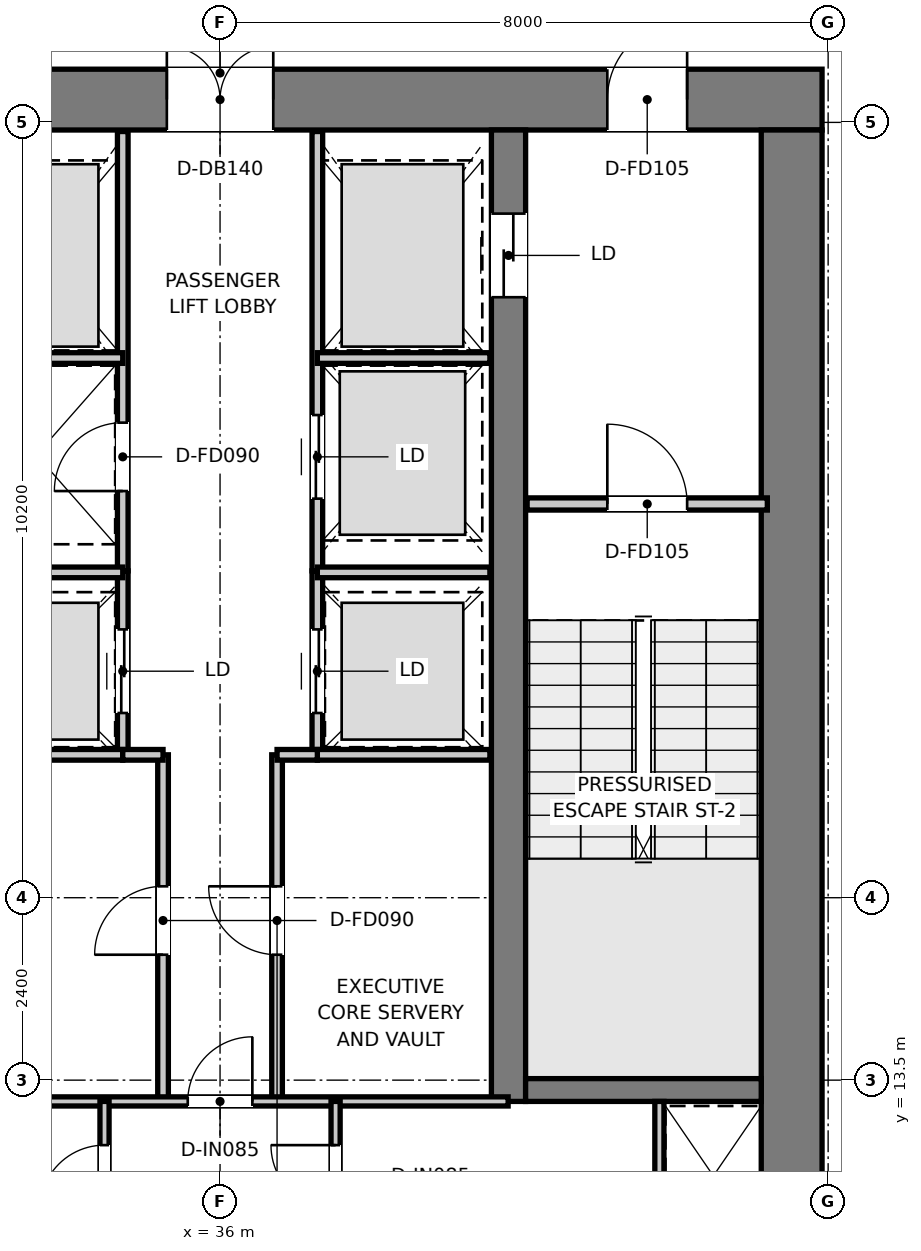
"""IFC4 building model, lengths in metres.
Left out: names, types, materials, properties, quantities, classifications, styles, units other than length and angle.
Written with IfcOpenShell. Run it as: python <this file> out.ifc"""

import sys

from ifc_helpers import new_model, si_unit, direction, frame, frame_2d, origin, place, context, subcontext, project, spatial, rectangle, extrude, element, fill, save


model = new_model("IFC4")
c1 = context("Model", 3, precision=1e-05, world=origin(), true_north=direction((0.0, 1.0)))
c2 = subcontext(c1, "Body", "Model", "MODEL_VIEW")
j1 = project(units=[si_unit("LENGTHUNIT", "METRE"), si_unit("PLANEANGLEUNIT", "RADIAN")], contexts=[c1])
p1 = place(None, origin())
s1 = spatial("IfcSite", under=j1, at=p1, CompositionType="ELEMENT")
p2 = place(p1, origin())
s2 = spatial("IfcBuilding", under=s1, at=p2, CompositionType="ELEMENT")
p3 = place(p2, frame((0.0, 0.0, 271.35)))
s3 = spatial("IfcBuildingStorey", under=s2, at=p3, CompositionType="ELEMENT", Elevation=271.35)
p4 = place(p3, frame((28.08, 26.4, 0.0), z_axis=(0.0, 0.0, 1.0), x_axis=(1.0, 0.0, 0.0)))
e1 = element("IfcWall", 1, at=p4, inside=s3, PredefinedType="SHEAR", context=c2, shape_type="SweptSolid", body=[
    extrude(rectangle(XDim=15.84, YDim=0.8, at=frame_2d((7.92, 0.0))), origin(), (0.0, 0.0, 1.0), 3.95),
])
p5 = place(p4, frame((7.22, 0.0, 0.0)))
e2 = element("IfcOpeningElement", 2, at=p5, cuts=e1, PredefinedType="OPENING", context=c2, shape_type="SweptSolid", body=[
    extrude(rectangle(XDim=1.4, YDim=2.2, at=frame_2d((0.7, 1.1))), frame((0.0, 0.41, 0.0), z_axis=(0.0, -1.0, 0.0), x_axis=(1.0, 0.0, 0.0)), (0.0, 0.0, 1.0), 0.82),
])
p6 = place(p4, frame((1.775, 0.0, 0.0)))
e3 = element("IfcOpeningElement", 3, at=p6, cuts=e1, PredefinedType="OPENING", context=c2, shape_type="SweptSolid", body=[
    extrude(rectangle(XDim=1.05, YDim=2.1, at=frame_2d((0.525, 1.05))), frame((0.0, 0.41, 0.0), z_axis=(0.0, -1.0, 0.0), x_axis=(1.0, 0.0, 0.0)), (0.0, 0.0, 1.0), 0.82),
])
p7 = place(p4, frame((13.015, 0.0, 0.0)))
e4 = element("IfcOpeningElement", 4, at=p7, cuts=e1, PredefinedType="OPENING", context=c2, shape_type="SweptSolid", body=[
    extrude(rectangle(XDim=1.05, YDim=2.1, at=frame_2d((0.525, 1.05))), frame((0.0, 0.41, 0.0), z_axis=(0.0, -1.0, 0.0), x_axis=(1.0, 0.0, 0.0)), (0.0, 0.0, 1.0), 0.82),
])
p8 = place(p3, frame((43.52, 11.3, 0.0), z_axis=(0.0, 0.0, 1.0), x_axis=(0.0, 1.0, 0.0)))
e5 = element("IfcWall", 5, at=p8, inside=s3, PredefinedType="SHEAR", context=c2, shape_type="SweptSolid", body=[
    extrude(rectangle(XDim=14.7, YDim=0.8, at=frame_2d((7.35, 0.0))), origin(), (0.0, 0.0, 1.0), 3.95),
])
p9 = place(p3, frame((39.795, 13.22, 0.0), z_axis=(0.0, 0.0, 1.0), x_axis=(0.0, 1.0, 0.0)))
e6 = element("IfcWall", 6, at=p9, inside=s3, PredefinedType="SHEAR", context=c2, shape_type="SweptSolid", body=[
    extrude(rectangle(XDim=12.78, YDim=0.45, at=frame_2d((6.39, 0.0))), origin(), (0.0, 0.0, 1.0), 3.95),
])
p10 = place(p9, frame((10.58, 0.0, 0.0)))
e7 = element("IfcOpeningElement", 7, at=p10, cuts=e6, PredefinedType="OPENING", context=c2, shape_type="SweptSolid", body=[
    extrude(rectangle(XDim=1.1, YDim=2.15, at=frame_2d((0.55, 1.075))), frame((0.0, 0.235, 0.0), z_axis=(0.0, -1.0, 0.0), x_axis=(1.0, 0.0, 0.0)), (0.0, 0.0, 1.0), 0.47),
])
p11 = place(p3, frame((40.02, 13.37, 0.0), z_axis=(0.0, 0.0, 1.0), x_axis=(1.0, 0.0, 0.0)))
e8 = element("IfcWall", 8, at=p11, inside=s3, PredefinedType="SHEAR", context=c2, shape_type="SweptSolid", body=[
    extrude(rectangle(XDim=3.1, YDim=0.3, at=frame_2d((1.55, 0.0))), origin(), (0.0, 0.0, 1.0), 3.95),
])
p12 = place(p3, frame((40.04, 21.08, 0.0), z_axis=(0.0, 0.0, 1.0), x_axis=(1.0, 0.0, 0.0)))
e9 = element("IfcWall", 9, at=p12, inside=s3, PredefinedType="PARTITIONING", context=c2, shape_type="SweptSolid", body=[
    extrude(rectangle(XDim=3.16, YDim=0.16, at=frame_2d((1.58, 0.0))), origin(), (0.0, 0.0, 1.0), 3.67),
])
p13 = place(p12, frame((1.055, 0.0, 0.0)))
e10 = element("IfcOpeningElement", 10, at=p13, cuts=e9, PredefinedType="OPENING", context=c2, shape_type="SweptSolid", body=[
    extrude(rectangle(XDim=1.05, YDim=2.1, at=frame_2d((0.525, 1.05))), frame((0.0, 0.09, 0.0), z_axis=(0.0, -1.0, 0.0), x_axis=(1.0, 0.0, 0.0)), (0.0, 0.0, 1.0), 0.18),
])
p14 = place(p3, frame((34.72, 20.2, 0.0), z_axis=(0.0, 0.0, 1.0), x_axis=(0.0, 1.0, 0.0)))
e11 = element("IfcWall", 11, at=p14, inside=s3, PredefinedType="PARTITIONING", context=c2, shape_type="SweptSolid", body=[
    extrude(rectangle(XDim=5.78, YDim=0.14, at=frame_2d((2.89, 0.0))), origin(), (0.0, 0.0, 1.0), 2.82),
])
p15 = place(p14, frame((1.05, 0.0, 0.0)))
e12 = element("IfcOpeningElement", 12, at=p15, cuts=e11, PredefinedType="OPENING", context=c2, shape_type="SweptSolid", body=[
    extrude(rectangle(XDim=0.9, YDim=2.1, at=frame_2d((0.45, 1.05))), frame((0.0, 0.08, 0.0), z_axis=(0.0, -1.0, 0.0), x_axis=(1.0, 0.0, 0.0)), (0.0, 0.0, 1.0), 0.16),
])
p16 = place(p3, frame((37.28, 20.2, 0.0), z_axis=(0.0, 0.0, 1.0), x_axis=(0.0, 1.0, 0.0)))
e13 = element("IfcWall", 13, at=p16, inside=s3, PredefinedType="PARTITIONING", context=c2, shape_type="SweptSolid", body=[
    extrude(rectangle(XDim=5.78, YDim=0.14, at=frame_2d((2.89, 0.0))), origin(), (0.0, 0.0, 1.0), 2.82),
])
p17 = place(p16, frame((0.95, 0.0, 0.0)))
e14 = element("IfcOpeningElement", 14, at=p17, cuts=e13, PredefinedType="OPENING", context=c2, shape_type="SweptSolid", body=[
    extrude(rectangle(XDim=1.1, YDim=2.15, at=frame_2d((0.55, 1.075))), frame((0.0, 0.08, 0.0), z_axis=(0.0, -1.0, 0.0), x_axis=(1.0, 0.0, 0.0)), (0.0, 0.0, 1.0), 0.16),
])
for number, where, z_axis, x_axis in (
    (15, (32.45, 23.0, 0.0), (0.0, 0.0, 1.0), (1.0, 0.0, 0.0)),
    (16, (37.28, 23.0, 0.0), (0.0, 0.0, 1.0), (1.0, 0.0, 0.0)),
):
    element("IfcWall", number, at=place(p3, frame(where, z_axis=z_axis, x_axis=x_axis)), inside=s3, PredefinedType="PARTITIONING", context=c2, shape_type="SweptSolid", body=[
        extrude(rectangle(XDim=2.27, YDim=0.14, at=frame_2d((1.135, 0.0))), origin(), (0.0, 0.0, 1.0), 2.82),
    ])
p18 = place(p3, frame((34.72, 17.78, 0.0), z_axis=(0.0, 0.0, 1.0), x_axis=(0.0, 1.0, 0.0)))
e17 = element("IfcWall", 17, at=p18, inside=s3, PredefinedType="PARTITIONING", context=c2, shape_type="SweptSolid", body=[
    extrude(rectangle(XDim=2.42, YDim=0.14, at=frame_2d((1.21, 0.0))), origin(), (0.0, 0.0, 1.0), 3.67),
])
p19 = place(p18, frame((0.55, 0.0, 0.0)))
e18 = element("IfcOpeningElement", 18, at=p19, cuts=e17, PredefinedType="OPENING", context=c2, shape_type="SweptSolid", body=[
    extrude(rectangle(XDim=1.1, YDim=2.15, at=frame_2d((0.55, 1.075))), frame((0.0, 0.08, 0.0), z_axis=(0.0, -1.0, 0.0), x_axis=(1.0, 0.0, 0.0)), (0.0, 0.0, 1.0), 0.16),
])
p20 = place(p3, frame((37.28, 17.78, 0.0), z_axis=(0.0, 0.0, 1.0), x_axis=(0.0, 1.0, 0.0)))
e19 = element("IfcWall", 19, at=p20, inside=s3, PredefinedType="PARTITIONING", context=c2, shape_type="SweptSolid", body=[
    extrude(rectangle(XDim=2.42, YDim=0.14, at=frame_2d((1.21, 0.0))), origin(), (0.0, 0.0, 1.0), 3.67),
])
p21 = place(p20, frame((0.55, 0.0, 0.0)))
e20 = element("IfcOpeningElement", 20, at=p21, cuts=e19, PredefinedType="OPENING", context=c2, shape_type="SweptSolid", body=[
    extrude(rectangle(XDim=1.1, YDim=2.15, at=frame_2d((0.55, 1.075))), frame((0.0, 0.08, 0.0), z_axis=(0.0, -1.0, 0.0), x_axis=(1.0, 0.0, 0.0)), (0.0, 0.0, 1.0), 0.16),
])
for number, where, z_axis, x_axis in (
    (21, (32.45, 17.78, 0.0), (0.0, 0.0, 1.0), (1.0, 0.0, 0.0)),
    (22, (32.45, 20.18, 0.0), (0.0, 0.0, 1.0), (1.0, 0.0, 0.0)),
    (23, (37.28, 17.78, 0.0), (0.0, 0.0, 1.0), (1.0, 0.0, 0.0)),
    (24, (37.28, 20.18, 0.0), (0.0, 0.0, 1.0), (1.0, 0.0, 0.0)),
):
    element("IfcWall", number, at=place(p3, frame(where, z_axis=z_axis, x_axis=x_axis)), inside=s3, PredefinedType="PARTITIONING", context=c2, shape_type="SweptSolid", body=[
        extrude(rectangle(XDim=2.27, YDim=0.14, at=frame_2d((1.135, 0.0))), origin(), (0.0, 0.0, 1.0), 3.67),
    ])
p22 = place(p3, frame((35.25, 13.22, 0.0), z_axis=(0.0, 0.0, 1.0), x_axis=(0.0, 1.0, 0.0)))
e25 = element("IfcWall", 25, at=p22, inside=s3, PredefinedType="PARTITIONING", context=c2, shape_type="SweptSolid", body=[
    extrude(rectangle(XDim=4.56, YDim=0.14, at=frame_2d((2.28, 0.0))), origin(), (0.0, 0.0, 1.0), 3.67),
])
p23 = place(p22, frame((1.93, 0.0, 0.0)))
e26 = element("IfcOpeningElement", 26, at=p23, cuts=e25, PredefinedType="OPENING", context=c2, shape_type="SweptSolid", body=[
    extrude(rectangle(XDim=0.9, YDim=2.1, at=frame_2d((0.45, 1.05))), frame((0.0, 0.08, 0.0), z_axis=(0.0, -1.0, 0.0), x_axis=(1.0, 0.0, 0.0)), (0.0, 0.0, 1.0), 0.16),
])
p24 = place(p3, frame((34.72, 17.78, 0.0), z_axis=(0.0, 0.0, 1.0), x_axis=(1.0, 0.0, 0.0)))
e27 = element("IfcWall", 27, at=p24, inside=s3, PredefinedType="PARTITIONING", context=c2, shape_type="SweptSolid", body=[
    extrude(rectangle(XDim=0.53, YDim=0.14, at=frame_2d((0.265, 0.0))), origin(), (0.0, 0.0, 1.0), 3.67),
])
p25 = place(p3, frame((36.75, 13.22, 0.0), z_axis=(0.0, 0.0, 1.0), x_axis=(0.0, 1.0, 0.0)))
e28 = element("IfcWall", 28, at=p25, inside=s3, PredefinedType="PARTITIONING", context=c2, shape_type="SweptSolid", body=[
    extrude(rectangle(XDim=4.56, YDim=0.14, at=frame_2d((2.28, 0.0))), origin(), (0.0, 0.0, 1.0), 3.67),
])
p26 = place(p25, frame((1.93, 0.0, 0.0)))
e29 = element("IfcOpeningElement", 29, at=p26, cuts=e28, PredefinedType="OPENING", context=c2, shape_type="SweptSolid", body=[
    extrude(rectangle(XDim=0.9, YDim=2.1, at=frame_2d((0.45, 1.05))), frame((0.0, 0.08, 0.0), z_axis=(0.0, -1.0, 0.0), x_axis=(1.0, 0.0, 0.0)), (0.0, 0.0, 1.0), 0.16),
])
p27 = place(p3, frame((36.75, 17.78, 0.0), z_axis=(0.0, 0.0, 1.0), x_axis=(1.0, 0.0, 0.0)))
e30 = element("IfcWall", 30, at=p27, inside=s3, PredefinedType="PARTITIONING", context=c2, shape_type="SweptSolid", body=[
    extrude(rectangle(XDim=0.53, YDim=0.14, at=frame_2d((0.265, 0.0))), origin(), (0.0, 0.0, 1.0), 3.67),
])
p28 = place(p3, frame((41.78, 11.25, 0.0), z_axis=(0.0, 0.0, 1.0), x_axis=(0.0, 1.0, 0.0)))
e31 = element("IfcWall", 31, at=p28, inside=s3, PredefinedType="PARTITIONING", context=c2, shape_type="SweptSolid", body=[
    extrude(rectangle(XDim=1.97, YDim=0.12, at=frame_2d((0.985, 0.0))), origin(), (0.0, 0.0, 1.0), 3.67),
])
p29 = place(p3, frame((32.21, 13.22, 0.0), z_axis=(0.0, 0.0, 1.0), x_axis=(1.0, 0.0, 0.0)))
e32 = element("IfcWall", 32, at=p29, inside=s3, PredefinedType="PARTITIONING", context=c2, shape_type="SweptSolid", body=[
    extrude(rectangle(XDim=7.58, YDim=0.12, at=frame_2d((3.79, 0.0))), origin(), (0.0, 0.0, 1.0), 3.67),
])
p30 = place(p29, frame((3.365, 0.0, 0.0)))
e33 = element("IfcOpeningElement", 33, at=p30, cuts=e32, PredefinedType="OPENING", context=c2, shape_type="SweptSolid", body=[
    extrude(rectangle(XDim=0.85, YDim=2.1, at=frame_2d((0.425, 1.05))), frame((0.0, 0.07, 0.0), z_axis=(0.0, -1.0, 0.0), x_axis=(1.0, 0.0, 0.0)), (0.0, 0.0, 1.0), 0.14),
])
p31 = place(p3, frame((34.48, 11.25, 0.0), z_axis=(0.0, 0.0, 1.0), x_axis=(0.0, 1.0, 0.0)))
e34 = element("IfcWall", 34, at=p31, inside=s3, PredefinedType="PARTITIONING", context=c2, shape_type="SweptSolid", body=[
    extrude(rectangle(XDim=1.97, YDim=0.12, at=frame_2d((0.985, 0.0))), origin(), (0.0, 0.0, 1.0), 3.67),
])
p32 = place(p31, frame((0.545, 0.0, 0.0)))
e35 = element("IfcOpeningElement", 35, at=p32, cuts=e34, PredefinedType="OPENING", context=c2, shape_type="SweptSolid", body=[
    extrude(rectangle(XDim=0.85, YDim=2.1, at=frame_2d((0.425, 1.05))), frame((0.0, 0.07, 0.0), z_axis=(0.0, -1.0, 0.0), x_axis=(1.0, 0.0, 0.0)), (0.0, 0.0, 1.0), 0.14),
])
p33 = place(p3, frame((37.52, 11.25, 0.0), z_axis=(0.0, 0.0, 1.0), x_axis=(0.0, 1.0, 0.0)))
e36 = element("IfcWall", 36, at=p33, inside=s3, PredefinedType="PARTITIONING", context=c2, shape_type="SweptSolid", body=[
    extrude(rectangle(XDim=1.97, YDim=0.12, at=frame_2d((0.985, 0.0))), origin(), (0.0, 0.0, 1.0), 3.67),
])
p34 = place(p33, frame((0.545, 0.0, 0.0)))
e37 = element("IfcOpeningElement", 37, at=p34, cuts=e36, PredefinedType="OPENING", context=c2, shape_type="SweptSolid", body=[
    extrude(rectangle(XDim=0.85, YDim=2.1, at=frame_2d((0.425, 1.05))), frame((0.0, 0.07, 0.0), z_axis=(0.0, -1.0, 0.0), x_axis=(1.0, 0.0, 0.0)), (0.0, 0.0, 1.0), 0.14),
])
p35 = place(p13, origin())
e38 = element("IfcDoor", 38, at=p35, inside=s3, OperationType="SINGLE_SWING_LEFT", PredefinedType="DOOR", context=c2, shape_type="SweptSolid", body=[
    extrude(rectangle(XDim=1.05, YDim=2.1, at=frame_2d((0.525, 1.05))), frame((0.0, 0.025, 0.0), z_axis=(0.0, -1.0, 0.0), x_axis=(1.0, 0.0, 0.0)), (0.0, 0.0, 1.0), 0.05),
])
fill(e10, e38)
p36 = place(p5, origin())
e39 = element("IfcDoor", 39, at=p36, inside=s3, OperationType="DOUBLE_DOOR_SINGLE_SWING", PredefinedType="DOOR", context=c2, shape_type="SweptSolid", body=[
    extrude(rectangle(XDim=1.4, YDim=2.2, at=frame_2d((0.7, 1.1))), frame((0.0, 0.025, 0.0), z_axis=(0.0, -1.0, 0.0), x_axis=(1.0, 0.0, 0.0)), (0.0, 0.0, 1.0), 0.05),
])
fill(e2, e39)
p37 = place(p7, origin())
e40 = element("IfcDoor", 40, at=p37, inside=s3, OperationType="SINGLE_SWING_RIGHT", PredefinedType="DOOR", context=c2, shape_type="SweptSolid", body=[
    extrude(rectangle(XDim=1.05, YDim=2.1, at=frame_2d((0.525, 1.05))), frame((0.0, 0.025, 0.0), z_axis=(0.0, -1.0, 0.0), x_axis=(1.0, 0.0, 0.0)), (0.0, 0.0, 1.0), 0.05),
])
fill(e4, e40)
p38 = place(p10, origin())
e41 = element("IfcDoor", 41, at=p38, inside=s3, OperationType="DOUBLE_DOOR_SLIDING", PredefinedType="DOOR", context=c2, shape_type="SweptSolid", body=[
    extrude(rectangle(XDim=1.1, YDim=2.15, at=frame_2d((0.55, 1.075))), frame((0.0, 0.025, 0.0), z_axis=(0.0, -1.0, 0.0), x_axis=(1.0, 0.0, 0.0)), (0.0, 0.0, 1.0), 0.05),
])
fill(e7, e41)
p39 = place(p15, origin())
e42 = element("IfcDoor", 42, at=p39, inside=s3, OperationType="SINGLE_SWING_LEFT", PredefinedType="DOOR", context=c2, shape_type="SweptSolid", body=[
    extrude(rectangle(XDim=0.9, YDim=2.1, at=frame_2d((0.45, 1.05))), frame((0.0, 0.025, 0.0), z_axis=(0.0, -1.0, 0.0), x_axis=(1.0, 0.0, 0.0)), (0.0, 0.0, 1.0), 0.05),
])
fill(e12, e42)
p40 = place(p17, origin())
e43 = element("IfcDoor", 43, at=p40, inside=s3, OperationType="DOUBLE_DOOR_SLIDING", PredefinedType="DOOR", context=c2, shape_type="SweptSolid", body=[
    extrude(rectangle(XDim=1.1, YDim=2.15, at=frame_2d((0.55, 1.075))), frame((0.0, 0.025, 0.0), z_axis=(0.0, -1.0, 0.0), x_axis=(1.0, 0.0, 0.0)), (0.0, 0.0, 1.0), 0.05),
])
fill(e14, e43)
p41 = place(p19, origin())
e44 = element("IfcDoor", 44, at=p41, inside=s3, OperationType="DOUBLE_DOOR_SLIDING", PredefinedType="DOOR", context=c2, shape_type="SweptSolid", body=[
    extrude(rectangle(XDim=1.1, YDim=2.15, at=frame_2d((0.55, 1.075))), frame((0.0, 0.025, 0.0), z_axis=(0.0, -1.0, 0.0), x_axis=(1.0, 0.0, 0.0)), (0.0, 0.0, 1.0), 0.05),
])
fill(e18, e44)
p42 = place(p21, origin())
e45 = element("IfcDoor", 45, at=p42, inside=s3, OperationType="DOUBLE_DOOR_SLIDING", PredefinedType="DOOR", context=c2, shape_type="SweptSolid", body=[
    extrude(rectangle(XDim=1.1, YDim=2.15, at=frame_2d((0.55, 1.075))), frame((0.0, 0.025, 0.0), z_axis=(0.0, -1.0, 0.0), x_axis=(1.0, 0.0, 0.0)), (0.0, 0.0, 1.0), 0.05),
])
fill(e20, e45)
p43 = place(p23, origin())
e46 = element("IfcDoor", 46, at=p43, inside=s3, OperationType="SINGLE_SWING_LEFT", PredefinedType="DOOR", context=c2, shape_type="SweptSolid", body=[
    extrude(rectangle(XDim=0.9, YDim=2.1, at=frame_2d((0.45, 1.05))), frame((0.0, 0.025, 0.0), z_axis=(0.0, -1.0, 0.0), x_axis=(1.0, 0.0, 0.0)), (0.0, 0.0, 1.0), 0.05),
])
fill(e26, e46)
p44 = place(p26, origin())
e47 = element("IfcDoor", 47, at=p44, inside=s3, OperationType="SINGLE_SWING_RIGHT", PredefinedType="DOOR", context=c2, shape_type="SweptSolid", body=[
    extrude(rectangle(XDim=0.9, YDim=2.1, at=frame_2d((0.45, 1.05))), frame((0.0, 0.025, 0.0), z_axis=(0.0, -1.0, 0.0), x_axis=(1.0, 0.0, 0.0)), (0.0, 0.0, 1.0), 0.05),
])
fill(e29, e47)
p45 = place(p30, origin())
e48 = element("IfcDoor", 48, at=p45, inside=s3, OperationType="SINGLE_SWING_RIGHT", PredefinedType="DOOR", context=c2, shape_type="SweptSolid", body=[
    extrude(rectangle(XDim=0.85, YDim=2.1, at=frame_2d((0.425, 1.05))), frame((0.0, 0.025, 0.0), z_axis=(0.0, -1.0, 0.0), x_axis=(1.0, 0.0, 0.0)), (0.0, 0.0, 1.0), 0.05),
])
fill(e33, e48)
p46 = place(p32, origin())
e49 = element("IfcDoor", 49, at=p46, inside=s3, OperationType="SINGLE_SWING_LEFT", PredefinedType="DOOR", context=c2, shape_type="SweptSolid", body=[
    extrude(rectangle(XDim=0.85, YDim=2.1, at=frame_2d((0.425, 1.05))), frame((0.0, 0.025, 0.0), z_axis=(0.0, -1.0, 0.0), x_axis=(1.0, 0.0, 0.0)), (0.0, 0.0, 1.0), 0.05),
])
fill(e35, e49)
p47 = place(p34, origin())
e50 = element("IfcDoor", 50, at=p47, inside=s3, OperationType="SINGLE_SWING_RIGHT", PredefinedType="DOOR", context=c2, shape_type="SweptSolid", body=[
    extrude(rectangle(XDim=0.85, YDim=2.1, at=frame_2d((0.425, 1.05))), frame((0.0, 0.025, 0.0), z_axis=(0.0, -1.0, 0.0), x_axis=(1.0, 0.0, 0.0)), (0.0, 0.0, 1.0), 0.05),
])
fill(e37, e50)
save(model, sys.argv[1])
